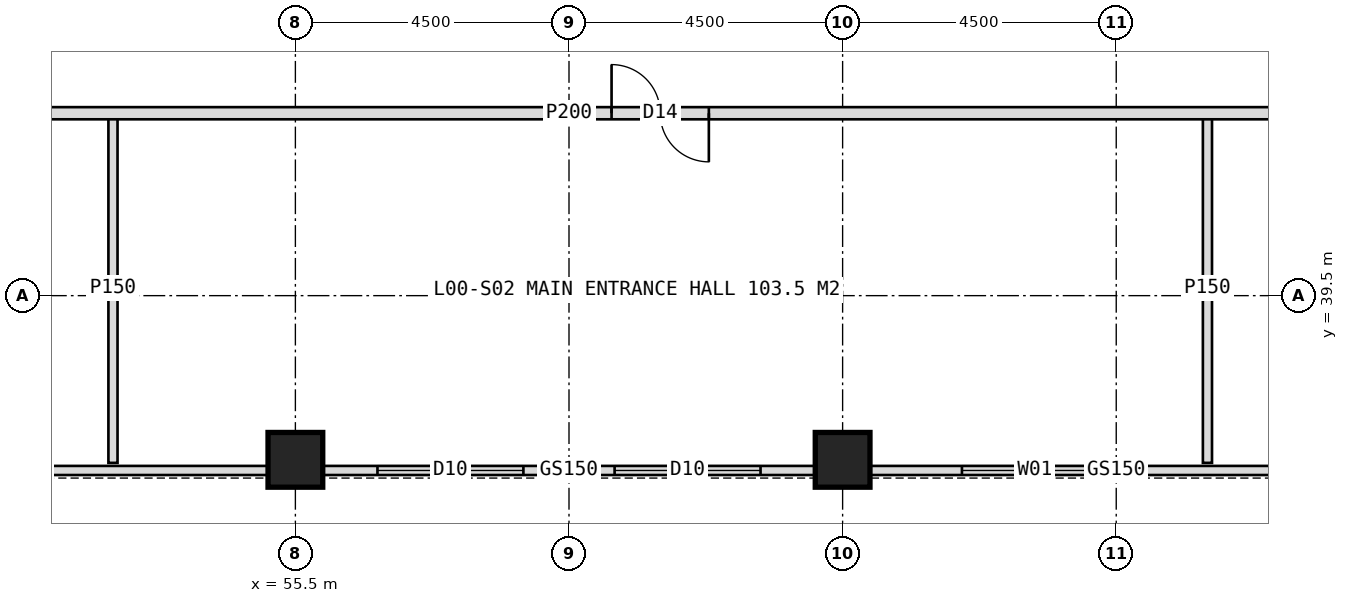
"""IFC4 building model, lengths in metres.
Left out: names, types, materials, properties, quantities, classifications, styles, units other than length and angle.
Written with IfcOpenShell. Run it as: python <this file> out.ifc"""

import sys

from ifc_helpers import new_model, si_unit, direction, frame, frame_2d, origin, origin_2d, place, context, subcontext, project, spatial, rectangle, hollow_rectangle, extrude, element, fill, save


model = new_model("IFC4")
c1 = context("Model", 3, precision=1e-05, world=origin(), true_north=direction((0.0, 1.0)))
c2 = subcontext(c1, "Body", "Model", "MODEL_VIEW")
j1 = project(units=[si_unit("LENGTHUNIT", "METRE"), si_unit("PLANEANGLEUNIT", "RADIAN")], contexts=[c1])
p1 = place(None, origin())
s1 = spatial("IfcSite", under=j1, at=p1, CompositionType="ELEMENT")
p2 = place(p1, origin())
s2 = spatial("IfcBuilding", under=s1, at=p2, CompositionType="ELEMENT")
p3 = place(p2, origin())
s3 = spatial("IfcBuildingStorey", under=s2, at=p3, CompositionType="ELEMENT", Elevation=0.0)
for number, where, z_axis, x_axis in (
    (1, (55.5, 36.8, 0.0), (0.0, 0.0, 1.0), (1.0, 0.0, 0.0)),
    (2, (64.5, 36.8, 0.0), (0.0, 0.0, 1.0), (1.0, 0.0, 0.0)),
):
    element("IfcColumn", number, at=place(p3, frame(where, z_axis=z_axis, x_axis=x_axis)), inside=s3, PredefinedType="COLUMN", context=c2, shape_type="SweptSolid", body=[
        extrude(hollow_rectangle(XDim=0.9, YDim=0.9, WallThickness=0.08, at=origin_2d()), origin(), (0.0, 0.0, 1.0), 6.0),
    ])
p4 = place(p3, frame((46.95, 36.625, 0.0), z_axis=(0.0, 0.0, 1.0), x_axis=(1.0, 0.0, 0.0)))
e3 = element("IfcWall", 3, at=p4, inside=s3, PredefinedType="STANDARD", context=c2, shape_type="SweptSolid", body=[
    extrude(rectangle(XDim=8.1, YDim=0.15, at=frame_2d((4.05, 0.0))), origin(), (0.0, 0.0, 1.0), 5.1),
])
p5 = place(p4, frame((2.15, 0.0, 0.0)))
e4 = element("IfcOpeningElement", 4, at=p5, cuts=e3, PredefinedType="OPENING", context=c2, shape_type="SweptSolid", body=[
    extrude(rectangle(XDim=1.2, YDim=2.4, at=frame_2d((0.6, 1.2))), frame((0.0, 0.085, 0.0), z_axis=(0.0, -1.0, 0.0), x_axis=(1.0, 0.0, 0.0)), (0.0, 0.0, 1.0), 0.17),
])
p6 = place(p3, frame((55.95, 36.625, 0.0), z_axis=(0.0, 0.0, 1.0), x_axis=(1.0, 0.0, 0.0)))
e5 = element("IfcWall", 5, at=p6, inside=s3, PredefinedType="STANDARD", context=c2, shape_type="SweptSolid", body=[
    extrude(rectangle(XDim=8.1, YDim=0.15, at=frame_2d((4.05, 0.0))), origin(), (0.0, 0.0, 1.0), 5.1),
])
p7 = place(p6, frame((0.9, 0.0, 0.0)))
e6 = element("IfcOpeningElement", 6, at=p7, cuts=e5, PredefinedType="OPENING", context=c2, shape_type="SweptSolid", body=[
    extrude(rectangle(XDim=2.4, YDim=2.6, at=frame_2d((1.2, 1.3))), frame((0.0, 0.085, 0.0), z_axis=(0.0, -1.0, 0.0), x_axis=(1.0, 0.0, 0.0)), (0.0, 0.0, 1.0), 0.17),
])
p8 = place(p6, frame((4.8, 0.0, 0.0)))
e7 = element("IfcOpeningElement", 7, at=p8, cuts=e5, PredefinedType="OPENING", context=c2, shape_type="SweptSolid", body=[
    extrude(rectangle(XDim=2.4, YDim=2.6, at=frame_2d((1.2, 1.3))), frame((0.0, 0.085, 0.0), z_axis=(0.0, -1.0, 0.0), x_axis=(1.0, 0.0, 0.0)), (0.0, 0.0, 1.0), 0.17),
])
p9 = place(p3, frame((64.95, 36.625, 0.0), z_axis=(0.0, 0.0, 1.0), x_axis=(1.0, 0.0, 0.0)))
e8 = element("IfcWall", 8, at=p9, inside=s3, PredefinedType="STANDARD", context=c2, shape_type="SweptSolid", body=[
    extrude(rectangle(XDim=8.1, YDim=0.15, at=frame_2d((4.05, 0.0))), origin(), (0.0, 0.0, 1.0), 5.1),
])
p10 = place(p9, frame((1.512, 0.0, 0.6)))
e9 = element("IfcOpeningElement", 9, at=p10, cuts=e8, PredefinedType="OPENING", context=c2, shape_type="SweptSolid", body=[
    extrude(rectangle(XDim=2.4, YDim=3.0, at=frame_2d((1.2, 1.5))), frame((0.0, 0.085, 0.0), z_axis=(0.0, -1.0, 0.0), x_axis=(1.0, 0.0, 0.0)), (0.0, 0.0, 1.0), 0.17),
])
for number, where, z_axis, x_axis in (
    (10, (70.5, 42.5, 0.0), (0.0, 0.0, 1.0), (0.0, -1.0, 0.0)),
    (11, (52.5, 42.5, 0.0), (0.0, 0.0, 1.0), (0.0, -1.0, 0.0)),
):
    element("IfcWall", number, at=place(p3, frame(where, z_axis=z_axis, x_axis=x_axis)), inside=s3, PredefinedType="PARTITIONING", context=c2, shape_type="SweptSolid", body=[
        extrude(rectangle(XDim=5.75, YDim=0.15, at=frame_2d((2.875, 0.0))), origin(), (0.0, 0.0, 1.0), 5.7),
    ])
p11 = place(p3, frame((79.5, 42.5, 0.0), z_axis=(0.0, 0.0, 1.0), x_axis=(-1.0, 0.0, 0.0)))
e12 = element("IfcWall", 12, at=p11, inside=s3, PredefinedType="PARTITIONING", context=c2, shape_type="SweptSolid", body=[
    extrude(rectangle(XDim=39.0, YDim=0.2, at=frame_2d((19.5, 0.0))), origin(), (0.0, 0.0, 1.0), 5.7),
])
p12 = place(p11, frame((3.7, 0.0, 0.0)))
e13 = element("IfcOpeningElement", 13, at=p12, cuts=e12, PredefinedType="OPENING", context=c2, shape_type="SweptSolid", body=[
    extrude(rectangle(XDim=1.6, YDim=2.2, at=frame_2d((0.8, 1.1))), frame((0.0, 0.11, 0.0), z_axis=(0.0, -1.0, 0.0), x_axis=(1.0, 0.0, 0.0)), (0.0, 0.0, 1.0), 0.22),
])
p13 = place(p11, frame((17.2, 0.0, 0.0)))
e14 = element("IfcOpeningElement", 14, at=p13, cuts=e12, PredefinedType="OPENING", context=c2, shape_type="SweptSolid", body=[
    extrude(rectangle(XDim=1.6, YDim=2.2, at=frame_2d((0.8, 1.1))), frame((0.0, 0.11, 0.0), z_axis=(0.0, -1.0, 0.0), x_axis=(1.0, 0.0, 0.0)), (0.0, 0.0, 1.0), 0.22),
])
p14 = place(p11, frame((32.5, 0.0, 0.0)))
e15 = element("IfcOpeningElement", 15, at=p14, cuts=e12, PredefinedType="OPENING", context=c2, shape_type="SweptSolid", body=[
    extrude(rectangle(XDim=1.0, YDim=2.1, at=frame_2d((0.5, 1.05))), frame((0.0, 0.11, 0.0), z_axis=(0.0, -1.0, 0.0), x_axis=(1.0, 0.0, 0.0)), (0.0, 0.0, 1.0), 0.22),
])
p15 = place(p7, origin())
e16 = element("IfcDoor", 16, at=p15, inside=s3, OperationType="DOUBLE_DOOR_SLIDING", PredefinedType="DOOR", context=c2, shape_type="SweptSolid", body=[
    extrude(rectangle(XDim=2.4, YDim=2.6, at=frame_2d((1.2, 1.3))), frame((0.0, 0.025, 0.0), z_axis=(0.0, -1.0, 0.0), x_axis=(1.0, 0.0, 0.0)), (0.0, 0.0, 1.0), 0.05),
])
fill(e6, e16)
p16 = place(p8, origin())
e17 = element("IfcDoor", 17, at=p16, inside=s3, OperationType="DOUBLE_DOOR_SLIDING", PredefinedType="DOOR", context=c2, shape_type="SweptSolid", body=[
    extrude(rectangle(XDim=2.4, YDim=2.6, at=frame_2d((1.2, 1.3))), frame((0.0, 0.025, 0.0), z_axis=(0.0, -1.0, 0.0), x_axis=(1.0, 0.0, 0.0)), (0.0, 0.0, 1.0), 0.05),
])
fill(e7, e17)
p17 = place(p10, origin())
e18 = element("IfcWindow", 18, at=p17, inside=s3, PartitioningType="SINGLE_PANEL", PredefinedType="WINDOW", context=c2, shape_type="SweptSolid", body=[
    extrude(rectangle(XDim=2.4, YDim=3.0, at=frame_2d((1.2, 1.5))), frame((0.0, 0.03, 0.0), z_axis=(0.0, -1.0, 0.0), x_axis=(1.0, 0.0, 0.0)), (0.0, 0.0, 1.0), 0.06),
])
fill(e9, e18)
p18 = place(p13, origin())
e19 = element("IfcDoor", 19, at=p18, inside=s3, OperationType="DOUBLE_DOOR_DOUBLE_SWING", PredefinedType="DOOR", context=c2, shape_type="SweptSolid", body=[
    extrude(rectangle(XDim=1.6, YDim=2.2, at=frame_2d((0.8, 1.1))), frame((0.0, 0.025, 0.0), z_axis=(0.0, -1.0, 0.0), x_axis=(1.0, 0.0, 0.0)), (0.0, 0.0, 1.0), 0.05),
])
fill(e14, e19)
save(model, sys.argv[1])
